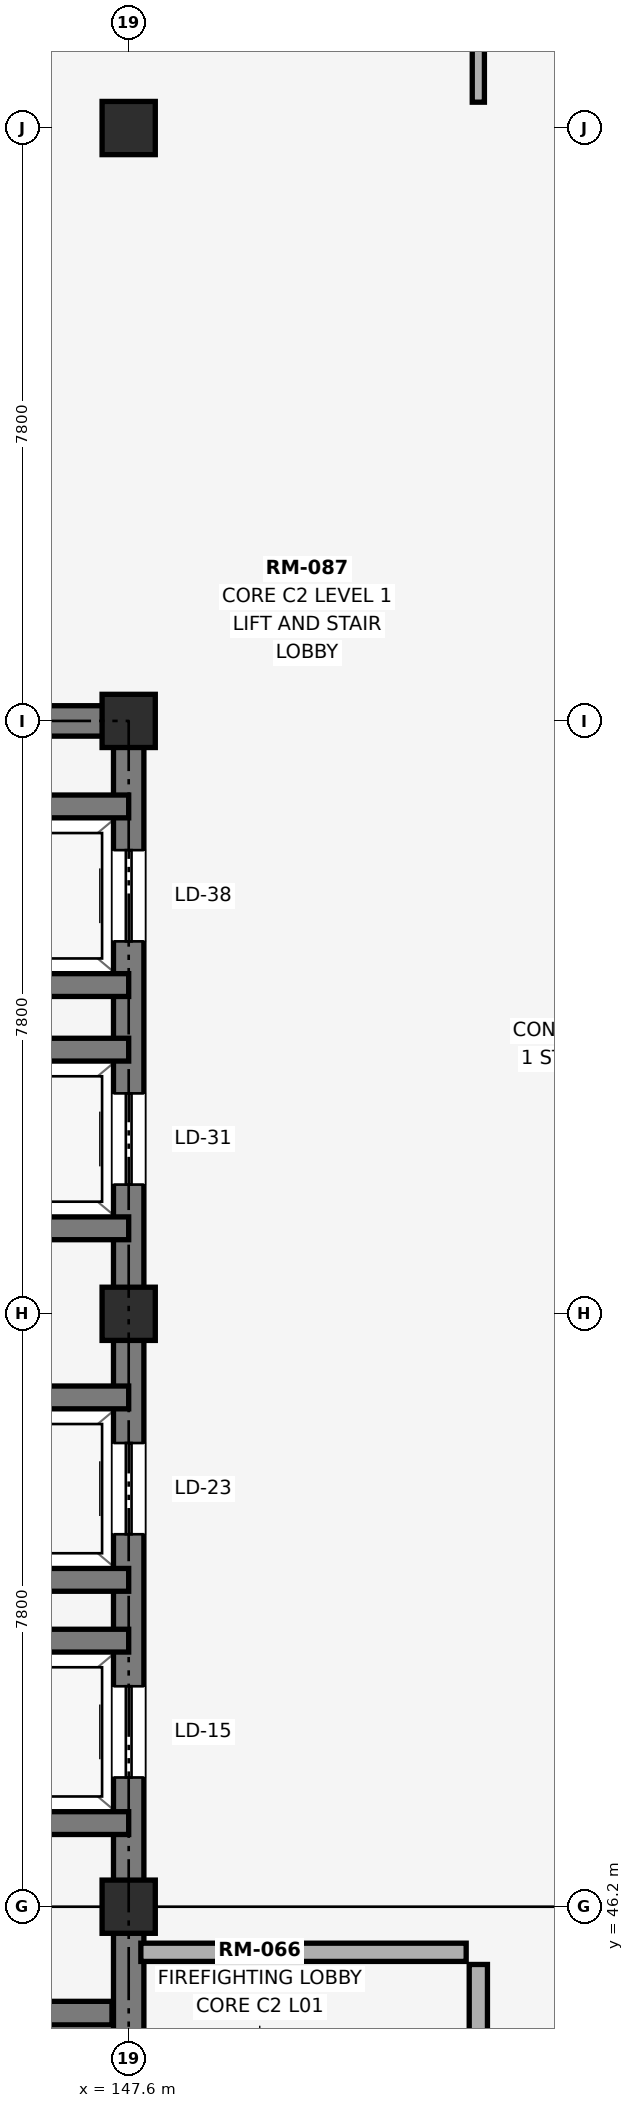
"""IFC4 building model, lengths in metres.
Left out: names, types, materials, properties, quantities, classifications, styles, units other than length and angle.
Written with IfcOpenShell. Run it as: python <this file> out.ifc"""

import sys

from ifc_helpers import new_model, si_unit, direction, frame, frame_2d, origin, origin_2d, place, context, subcontext, project, spatial, rectangle, extrude, element, fill, save


model = new_model("IFC4")
c1 = context("Model", 3, precision=1e-05, world=origin(), true_north=direction((0.0, 1.0)))
c2 = subcontext(c1, "Body", "Model", "MODEL_VIEW")
j1 = project(units=[si_unit("LENGTHUNIT", "METRE"), si_unit("PLANEANGLEUNIT", "RADIAN")], contexts=[c1])
p1 = place(None, origin())
s1 = spatial("IfcSite", under=j1, at=p1, CompositionType="ELEMENT")
p2 = place(p1, origin())
s2 = spatial("IfcBuilding", under=s1, at=p2, CompositionType="ELEMENT")
p3 = place(p2, frame((0.0, 0.0, 5.4)))
s3 = spatial("IfcBuildingStorey", under=s2, at=p3, CompositionType="ELEMENT", Elevation=5.4)
for number, where, z_axis, x_axis in (
    (1, (147.6, 46.2, 0.0), (0.0, 0.0, 1.0), (1.0, 0.0, 0.0)),
    (2, (147.6, 54.0, 0.0), (0.0, 0.0, 1.0), (1.0, 0.0, 0.0)),
    (3, (147.6, 61.8, 0.0), (0.0, 0.0, 1.0), (1.0, 0.0, 0.0)),
    (4, (147.6, 69.6, 0.0), (0.0, 0.0, 1.0), (1.0, 0.0, 0.0)),
):
    element("IfcColumn", number, at=place(p3, frame(where, z_axis=z_axis, x_axis=x_axis)), inside=s3, PredefinedType="COLUMN", context=c2, shape_type="SweptSolid", body=[
        extrude(rectangle(XDim=0.7, YDim=0.7, at=origin_2d()), origin(), (0.0, 0.0, 1.0), 4.8),
    ])
p4 = place(p3, frame((137.8, 61.8, 0.0), z_axis=(0.0, 0.0, 1.0), x_axis=(1.0, 0.0, 0.0)))
e5 = element("IfcWall", 5, at=p4, inside=s3, PredefinedType="SHEAR", context=c2, shape_type="SweptSolid", body=[
    extrude(rectangle(XDim=10.0, YDim=0.4, at=frame_2d((5.0, 0.0))), origin(), (0.0, 0.0, 1.0), 4.8),
])
p5 = place(p3, frame((147.6, 38.6, 0.0), z_axis=(0.0, 0.0, 1.0), x_axis=(0.0, 1.0, 0.0)))
e6 = element("IfcWall", 6, at=p5, inside=s3, PredefinedType="SHEAR", context=c2, shape_type="SweptSolid", body=[
    extrude(rectangle(XDim=23.0, YDim=0.4, at=frame_2d((11.5, 0.0))), origin(), (0.0, 0.0, 1.0), 4.8),
])
p6 = place(p5, frame((9.3, 0.0, 0.0)))
e7 = element("IfcOpeningElement", 7, at=p6, cuts=e6, PredefinedType="OPENING", context=c2, shape_type="SweptSolid", body=[
    extrude(rectangle(XDim=1.2, YDim=2.2, at=frame_2d((0.6, 1.1))), frame((0.0, 0.21, 0.0), z_axis=(0.0, -1.0, 0.0), x_axis=(1.0, 0.0, 0.0)), (0.0, 0.0, 1.0), 0.42),
])
p7 = place(p5, frame((12.5, 0.0, 0.0)))
e8 = element("IfcOpeningElement", 8, at=p7, cuts=e6, PredefinedType="OPENING", context=c2, shape_type="SweptSolid", body=[
    extrude(rectangle(XDim=1.2, YDim=2.2, at=frame_2d((0.6, 1.1))), frame((0.0, 0.21, 0.0), z_axis=(0.0, -1.0, 0.0), x_axis=(1.0, 0.0, 0.0)), (0.0, 0.0, 1.0), 0.42),
])
p8 = place(p5, frame((17.1, 0.0, 0.0)))
e9 = element("IfcOpeningElement", 9, at=p8, cuts=e6, PredefinedType="OPENING", context=c2, shape_type="SweptSolid", body=[
    extrude(rectangle(XDim=1.2, YDim=2.2, at=frame_2d((0.6, 1.1))), frame((0.0, 0.21, 0.0), z_axis=(0.0, -1.0, 0.0), x_axis=(1.0, 0.0, 0.0)), (0.0, 0.0, 1.0), 0.42),
])
p9 = place(p5, frame((20.3, 0.0, 0.0)))
e10 = element("IfcOpeningElement", 10, at=p9, cuts=e6, PredefinedType="OPENING", context=c2, shape_type="SweptSolid", body=[
    extrude(rectangle(XDim=1.2, YDim=2.2, at=frame_2d((0.6, 1.1))), frame((0.0, 0.21, 0.0), z_axis=(0.0, -1.0, 0.0), x_axis=(1.0, 0.0, 0.0)), (0.0, 0.0, 1.0), 0.42),
])
p10 = place(p5, frame((2.4, 0.0, 0.0)))
e11 = element("IfcOpeningElement", 11, at=p10, cuts=e6, PredefinedType="OPENING", context=c2, shape_type="SweptSolid", body=[
    extrude(rectangle(XDim=1.1, YDim=2.2, at=frame_2d((0.55, 1.1))), frame((0.0, 0.21, 0.0), z_axis=(0.0, -1.0, 0.0), x_axis=(1.0, 0.0, 0.0)), (0.0, 0.0, 1.0), 0.42),
])
p11 = place(p3, frame((138.22, 44.8, 0.0), z_axis=(0.0, 0.0, 1.0), x_axis=(1.0, 0.0, 0.0)))
e12 = element("IfcWall", 12, at=p11, inside=s3, PredefinedType="SHEAR", context=c2, shape_type="SweptSolid", body=[
    extrude(rectangle(XDim=9.16, YDim=0.31, at=frame_2d((4.58, 0.0))), origin(), (0.0, 0.0, 1.0), 4.8),
])
for number, where, z_axis, x_axis in (
    (13, (144.75, 47.3, 0.0), (0.0, 0.0, 1.0), (1.0, 0.0, 0.0)),
    (14, (144.75, 49.7, 0.0), (0.0, 0.0, 1.0), (1.0, 0.0, 0.0)),
    (15, (144.75, 50.5, 0.0), (0.0, 0.0, 1.0), (1.0, 0.0, 0.0)),
    (16, (144.75, 52.9, 0.0), (0.0, 0.0, 1.0), (1.0, 0.0, 0.0)),
):
    element("IfcWall", number, at=place(p3, frame(where, z_axis=z_axis, x_axis=x_axis)), inside=s3, PredefinedType="SHEAR", context=c2, shape_type="SweptSolid", body=[
        extrude(rectangle(XDim=2.85, YDim=0.3, at=frame_2d((1.425, 0.0))), origin(), (0.0, 0.0, 1.0), 4.8),
    ])
for number, where, z_axis, x_axis in (
    (17, (144.8, 55.125, 0.0), (0.0, 0.0, 1.0), (1.0, 0.0, 0.0)),
    (18, (144.8, 57.475, 0.0), (0.0, 0.0, 1.0), (1.0, 0.0, 0.0)),
    (19, (144.8, 58.325, 0.0), (0.0, 0.0, 1.0), (1.0, 0.0, 0.0)),
    (20, (144.8, 60.675, 0.0), (0.0, 0.0, 1.0), (1.0, 0.0, 0.0)),
):
    element("IfcWall", number, at=place(p3, frame(where, z_axis=z_axis, x_axis=x_axis)), inside=s3, PredefinedType="SHEAR", context=c2, shape_type="SweptSolid", body=[
        extrude(rectangle(XDim=2.8, YDim=0.3, at=frame_2d((1.4, 0.0))), origin(), (0.0, 0.0, 1.0), 4.8),
    ])
p12 = place(p3, frame((147.76, 45.6, 0.0), z_axis=(0.0, 0.0, 1.0), x_axis=(1.0, 0.0, 0.0)))
e21 = element("IfcWall", 21, at=p12, inside=s3, PredefinedType="PARTITIONING", context=c2, shape_type="SweptSolid", body=[
    extrude(rectangle(XDim=4.28, YDim=0.24, at=frame_2d((2.14, 0.0))), origin(), (0.0, 0.0, 1.0), 4.49),
])
p13 = place(p3, frame((152.2, 38.56, 0.0), z_axis=(0.0, 0.0, 1.0), x_axis=(0.0, 1.0, 0.0)))
e22 = element("IfcWall", 22, at=p13, inside=s3, PredefinedType="PARTITIONING", context=c2, shape_type="SweptSolid", body=[
    extrude(rectangle(XDim=6.88, YDim=0.24, at=frame_2d((3.44, 0.0))), origin(), (0.0, 0.0, 1.0), 4.49),
])
p14 = place(p13, frame((1.9, 0.0, 0.0)))
e23 = element("IfcOpeningElement", 23, at=p14, cuts=e22, PredefinedType="OPENING", context=c2, shape_type="SweptSolid", body=[
    extrude(rectangle(XDim=1.8, YDim=2.3, at=frame_2d((0.9, 1.15))), frame((0.0, 0.13, 0.0), z_axis=(0.0, -1.0, 0.0), x_axis=(1.0, 0.0, 0.0)), (0.0, 0.0, 1.0), 0.26),
])
p15 = place(p3, frame((152.2, 69.94, 0.0), z_axis=(0.0, 0.0, 1.0), x_axis=(0.0, 1.0, 0.0)))
e24 = element("IfcWall", 24, at=p15, inside=s3, PredefinedType="PARTITIONING", context=c2, shape_type="SweptSolid", body=[
    extrude(rectangle(XDim=29.3, YDim=0.16, at=frame_2d((14.65, 0.0))), origin(), (0.0, 0.0, 1.0), 4.49),
])
p16 = place(p15, frame((6.0, 0.0, 0.0)))
e25 = element("IfcOpeningElement", 25, at=p16, cuts=e24, PredefinedType="OPENING", context=c2, shape_type="SweptSolid", body=[
    extrude(rectangle(XDim=1.02, YDim=2.18, at=frame_2d((0.51, 1.09))), frame((0.0, 0.09, 0.0), z_axis=(0.0, -1.0, 0.0), x_axis=(1.0, 0.0, 0.0)), (0.0, 0.0, 1.0), 0.18),
])
p17 = place(p15, frame((19.0, 0.0, 0.0)))
e26 = element("IfcOpeningElement", 26, at=p17, cuts=e24, PredefinedType="OPENING", context=c2, shape_type="SweptSolid", body=[
    extrude(rectangle(XDim=0.95, YDim=2.15, at=frame_2d((0.475, 1.075))), frame((0.0, 0.09, 0.0), z_axis=(0.0, -1.0, 0.0), x_axis=(1.0, 0.0, 0.0)), (0.0, 0.0, 1.0), 0.18),
])
p18 = place(p6, origin())
e27 = element("IfcDoor", 27, at=p18, inside=s3, OperationType="SLIDING_TO_LEFT", PredefinedType="DOOR", context=c2, shape_type="SweptSolid", body=[
    extrude(rectangle(XDim=1.2, YDim=2.2, at=frame_2d((0.6, 1.1))), frame((0.0, 0.025, 0.0), z_axis=(0.0, -1.0, 0.0), x_axis=(1.0, 0.0, 0.0)), (0.0, 0.0, 1.0), 0.05),
])
fill(e7, e27)
p19 = place(p7, origin())
e28 = element("IfcDoor", 28, at=p19, inside=s3, OperationType="SLIDING_TO_LEFT", PredefinedType="DOOR", context=c2, shape_type="SweptSolid", body=[
    extrude(rectangle(XDim=1.2, YDim=2.2, at=frame_2d((0.6, 1.1))), frame((0.0, 0.025, 0.0), z_axis=(0.0, -1.0, 0.0), x_axis=(1.0, 0.0, 0.0)), (0.0, 0.0, 1.0), 0.05),
])
fill(e8, e28)
p20 = place(p8, origin())
e29 = element("IfcDoor", 29, at=p20, inside=s3, OperationType="SLIDING_TO_LEFT", PredefinedType="DOOR", context=c2, shape_type="SweptSolid", body=[
    extrude(rectangle(XDim=1.2, YDim=2.2, at=frame_2d((0.6, 1.1))), frame((0.0, 0.025, 0.0), z_axis=(0.0, -1.0, 0.0), x_axis=(1.0, 0.0, 0.0)), (0.0, 0.0, 1.0), 0.05),
])
fill(e9, e29)
p21 = place(p9, origin())
e30 = element("IfcDoor", 30, at=p21, inside=s3, OperationType="SLIDING_TO_RIGHT", PredefinedType="DOOR", context=c2, shape_type="SweptSolid", body=[
    extrude(rectangle(XDim=1.2, YDim=2.2, at=frame_2d((0.6, 1.1))), frame((0.0, 0.025, 0.0), z_axis=(0.0, -1.0, 0.0), x_axis=(1.0, 0.0, 0.0)), (0.0, 0.0, 1.0), 0.05),
])
fill(e10, e30)
save(model, sys.argv[1])
